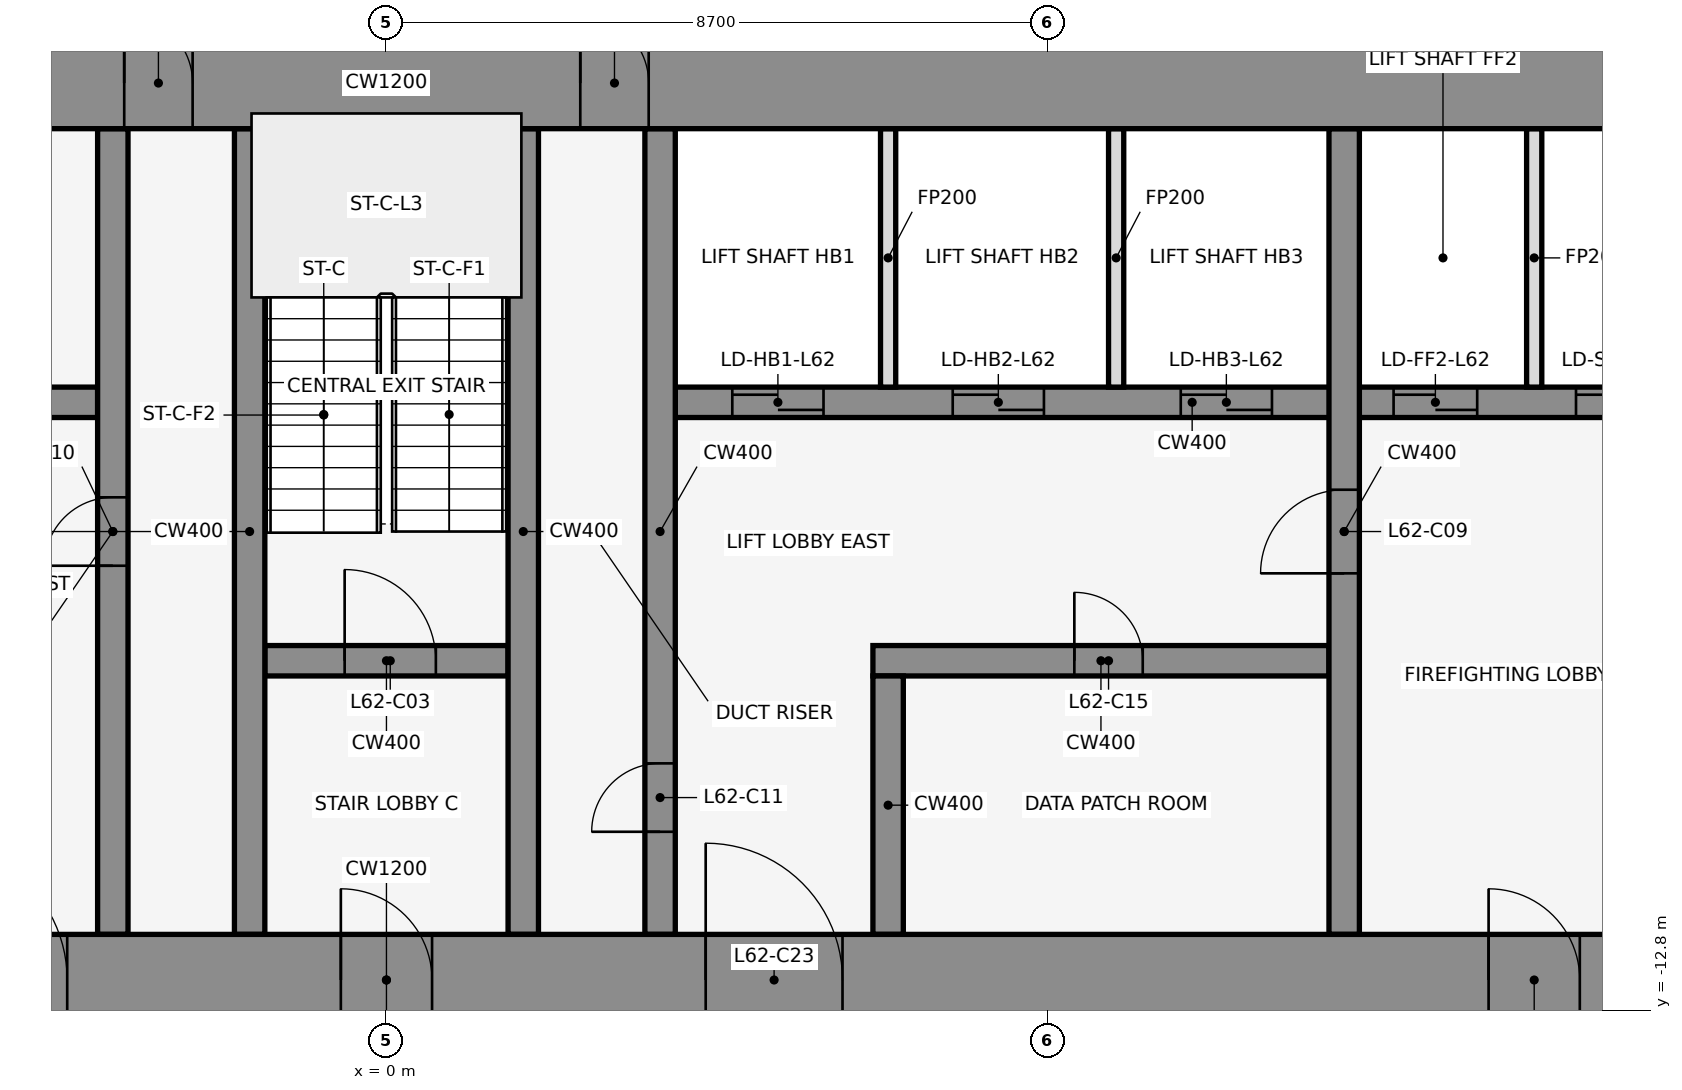
"""IFC4 building model, lengths in metres.
Left out: names, types, materials, properties, quantities, classifications, styles, units other than length and angle.
Written with IfcOpenShell. Run it as: python <this file> out.ifc"""

import sys

from ifc_helpers import new_model, si_unit, direction, frame, frame_2d, origin, place, context, subcontext, project, spatial, rectangle, extrude, element, fill, save


model = new_model("IFC4")
c1 = context("Model", 3, precision=1e-05, world=origin(), true_north=direction((0.0, 1.0)))
c2 = subcontext(c1, "Body", "Model", "MODEL_VIEW")
j1 = project(units=[si_unit("LENGTHUNIT", "METRE"), si_unit("PLANEANGLEUNIT", "RADIAN")], contexts=[c1])
p1 = place(None, origin())
s1 = spatial("IfcSite", under=j1, at=p1, CompositionType="ELEMENT")
p2 = place(p1, origin())
s2 = spatial("IfcBuilding", under=s1, at=p2, CompositionType="ELEMENT")
p3 = place(p2, frame((0.0, 0.0, 275.0)))
s3 = spatial("IfcBuildingStorey", under=s2, at=p3, CompositionType="ELEMENT", Elevation=275.0)
for number, where, z_axis, x_axis in (
    (1, (16.432, -0.105, 0.0), (0.0, 0.0, 1.0), (-0.84, 0.543, 0.0)),
    (2, (1.901, 1.08, 0.0), (0.0, 0.0, 1.0), (-0.84, -0.543, 0.0)),
    (3, (-0.068, -0.105, 0.0), (0.0, 0.0, 1.0), (-0.84, 0.543, 0.0)),
):
    element("IfcWall", number, at=place(p3, frame(where, z_axis=z_axis, x_axis=x_axis)), inside=s3, PredefinedType="STANDARD", context=c2, shape_type="SweptSolid", body=[
        extrude(rectangle(XDim=2.183, YDim=0.25, at=frame_2d((1.091, 0.0))), origin(), (0.0, 0.0, 1.0), 4.05),
    ])
p4 = place(p3, frame((-1.6, -8.2, 0.0), z_axis=(0.0, 0.0, 1.0), x_axis=(1.0, 0.0, 0.0)))
e4 = element("IfcWall", 4, at=p4, inside=s3, PredefinedType="SHEAR", context=c2, shape_type="SweptSolid", body=[
    extrude(rectangle(XDim=3.2, YDim=0.4, at=frame_2d((1.6, 0.0))), origin(), (0.0, 0.0, 1.0), 4.2),
])
p5 = place(p4, frame((1.05, 0.0, 0.0)))
e5 = element("IfcOpeningElement", 5, at=p5, cuts=e4, PredefinedType="OPENING", context=c2, shape_type="SweptSolid", body=[
    extrude(rectangle(XDim=1.2, YDim=2.1, at=frame_2d((0.6, 1.05))), frame((0.0, 0.212, 0.0), z_axis=(0.0, -1.0, 0.0), x_axis=(1.0, 0.0, 0.0)), (0.0, 0.0, 1.0), 0.424),
])
p6 = place(p3, frame((6.4, -8.2, 0.0), z_axis=(0.0, 0.0, 1.0), x_axis=(1.0, 0.0, 0.0)))
e6 = element("IfcWall", 6, at=p6, inside=s3, PredefinedType="SHEAR", context=c2, shape_type="SweptSolid", body=[
    extrude(rectangle(XDim=6.0, YDim=0.4, at=frame_2d((3.0, 0.0))), origin(), (0.0, 0.0, 1.0), 4.2),
])
p7 = place(p6, frame((2.65, 0.0, 0.0)))
e7 = element("IfcOpeningElement", 7, at=p7, cuts=e6, PredefinedType="OPENING", context=c2, shape_type="SweptSolid", body=[
    extrude(rectangle(XDim=0.9, YDim=2.1, at=frame_2d((0.45, 1.05))), frame((0.0, 0.212, 0.0), z_axis=(0.0, -1.0, 0.0), x_axis=(1.0, 0.0, 0.0)), (0.0, 0.0, 1.0), 0.424),
])
p8 = place(p3, frame((-17.4, -4.8, 0.0), z_axis=(0.0, 0.0, 1.0), x_axis=(1.0, 0.0, 0.0)))
e8 = element("IfcWall", 8, at=p8, inside=s3, PredefinedType="SHEAR", context=c2, shape_type="SweptSolid", body=[
    extrude(rectangle(XDim=13.6, YDim=0.4, at=frame_2d((6.8, 0.0))), origin(), (0.0, 0.0, 1.0), 4.2),
])
p9 = place(p8, frame((0.65, 0.0, 0.0)))
e9 = element("IfcOpeningElement", 9, at=p9, cuts=e8, PredefinedType="OPENING", context=c2, shape_type="SweptSolid", body=[
    extrude(rectangle(XDim=1.1, YDim=2.1, at=frame_2d((0.55, 1.05))), frame((0.0, 0.212, 0.0), z_axis=(0.0, -1.0, 0.0), x_axis=(1.0, 0.0, 0.0)), (0.0, 0.0, 1.0), 0.424),
])
p10 = place(p8, frame((2.95, 0.0, 0.0)))
e10 = element("IfcOpeningElement", 10, at=p10, cuts=e8, PredefinedType="OPENING", context=c2, shape_type="SweptSolid", body=[
    extrude(rectangle(XDim=1.1, YDim=2.1, at=frame_2d((0.55, 1.05))), frame((0.0, 0.212, 0.0), z_axis=(0.0, -1.0, 0.0), x_axis=(1.0, 0.0, 0.0)), (0.0, 0.0, 1.0), 0.424),
])
p11 = place(p8, frame((7.35, 0.0, 0.0)))
e11 = element("IfcOpeningElement", 11, at=p11, cuts=e8, PredefinedType="OPENING", context=c2, shape_type="SweptSolid", body=[
    extrude(rectangle(XDim=0.9, YDim=2.1, at=frame_2d((0.45, 1.05))), frame((0.0, 0.212, 0.0), z_axis=(0.0, -1.0, 0.0), x_axis=(1.0, 0.0, 0.0)), (0.0, 0.0, 1.0), 0.424),
])
p12 = place(p8, frame((11.75, 0.0, 0.0)))
e12 = element("IfcOpeningElement", 12, at=p12, cuts=e8, PredefinedType="OPENING", context=c2, shape_type="SweptSolid", body=[
    extrude(rectangle(XDim=0.9, YDim=2.1, at=frame_2d((0.45, 1.05))), frame((0.0, 0.212, 0.0), z_axis=(0.0, -1.0, 0.0), x_axis=(1.0, 0.0, 0.0)), (0.0, 0.0, 1.0), 0.424),
])
p13 = place(p3, frame((3.8, -4.8, 0.0), z_axis=(0.0, 0.0, 1.0), x_axis=(1.0, 0.0, 0.0)))
e13 = element("IfcWall", 13, at=p13, inside=s3, PredefinedType="SHEAR", context=c2, shape_type="SweptSolid", body=[
    extrude(rectangle(XDim=13.6, YDim=0.4, at=frame_2d((6.8, 0.0))), origin(), (0.0, 0.0, 1.0), 4.2),
])
p14 = place(p13, frame((0.75, 0.0, 0.0)))
e14 = element("IfcOpeningElement", 14, at=p14, cuts=e13, PredefinedType="OPENING", context=c2, shape_type="SweptSolid", body=[
    extrude(rectangle(XDim=1.2, YDim=2.1, at=frame_2d((0.6, 1.05))), frame((0.0, 0.212, 0.0), z_axis=(0.0, -1.0, 0.0), x_axis=(1.0, 0.0, 0.0)), (0.0, 0.0, 1.0), 0.424),
])
p15 = place(p13, frame((3.65, 0.0, 0.0)))
e15 = element("IfcOpeningElement", 15, at=p15, cuts=e13, PredefinedType="OPENING", context=c2, shape_type="SweptSolid", body=[
    extrude(rectangle(XDim=1.2, YDim=2.1, at=frame_2d((0.6, 1.05))), frame((0.0, 0.212, 0.0), z_axis=(0.0, -1.0, 0.0), x_axis=(1.0, 0.0, 0.0)), (0.0, 0.0, 1.0), 0.424),
])
p16 = place(p13, frame((6.65, 0.0, 0.0)))
e16 = element("IfcOpeningElement", 16, at=p16, cuts=e13, PredefinedType="OPENING", context=c2, shape_type="SweptSolid", body=[
    extrude(rectangle(XDim=1.2, YDim=2.1, at=frame_2d((0.6, 1.05))), frame((0.0, 0.212, 0.0), z_axis=(0.0, -1.0, 0.0), x_axis=(1.0, 0.0, 0.0)), (0.0, 0.0, 1.0), 0.424),
])
p17 = place(p13, frame((9.45, 0.0, 0.0)))
e17 = element("IfcOpeningElement", 17, at=p17, cuts=e13, PredefinedType="OPENING", context=c2, shape_type="SweptSolid", body=[
    extrude(rectangle(XDim=1.1, YDim=2.1, at=frame_2d((0.55, 1.05))), frame((0.0, 0.212, 0.0), z_axis=(0.0, -1.0, 0.0), x_axis=(1.0, 0.0, 0.0)), (0.0, 0.0, 1.0), 0.424),
])
p18 = place(p13, frame((11.85, 0.0, 0.0)))
e18 = element("IfcOpeningElement", 18, at=p18, cuts=e13, PredefinedType="OPENING", context=c2, shape_type="SweptSolid", body=[
    extrude(rectangle(XDim=1.1, YDim=2.1, at=frame_2d((0.55, 1.05))), frame((0.0, 0.212, 0.0), z_axis=(0.0, -1.0, 0.0), x_axis=(1.0, 0.0, 0.0)), (0.0, 0.0, 1.0), 0.424),
])
p19 = place(p3, frame((-3.6, -11.8, 0.0), z_axis=(0.0, 0.0, 1.0), x_axis=(0.0, 1.0, 0.0)))
e19 = element("IfcWall", 19, at=p19, inside=s3, PredefinedType="SHEAR", context=c2, shape_type="SweptSolid", body=[
    extrude(rectangle(XDim=10.6, YDim=0.4, at=frame_2d((5.3, 0.0))), origin(), (0.0, 0.0, 1.0), 4.2),
])
p20 = place(p19, frame((4.85, 0.0, 0.0)))
e20 = element("IfcOpeningElement", 20, at=p20, cuts=e19, PredefinedType="OPENING", context=c2, shape_type="SweptSolid", body=[
    extrude(rectangle(XDim=0.9, YDim=2.1, at=frame_2d((0.45, 1.05))), frame((0.0, 0.212, 0.0), z_axis=(0.0, -1.0, 0.0), x_axis=(1.0, 0.0, 0.0)), (0.0, 0.0, 1.0), 0.424),
])
for number, where, z_axis, x_axis in (
    (21, (-1.8, -11.8, 0.0), (0.0, 0.0, 1.0), (0.0, 1.0, 0.0)),
    (22, (1.8, -11.8, 0.0), (0.0, 0.0, 1.0), (0.0, 1.0, 0.0)),
):
    element("IfcWall", number, at=place(p3, frame(where, z_axis=z_axis, x_axis=x_axis)), inside=s3, PredefinedType="SHEAR", context=c2, shape_type="SweptSolid", body=[
        extrude(rectangle(XDim=10.6, YDim=0.4, at=frame_2d((5.3, 0.0))), origin(), (0.0, 0.0, 1.0), 4.2),
    ])
p21 = place(p3, frame((3.6, -11.8, 0.0), z_axis=(0.0, 0.0, 1.0), x_axis=(0.0, 1.0, 0.0)))
e23 = element("IfcWall", 23, at=p21, inside=s3, PredefinedType="SHEAR", context=c2, shape_type="SweptSolid", body=[
    extrude(rectangle(XDim=10.6, YDim=0.4, at=frame_2d((5.3, 0.0))), origin(), (0.0, 0.0, 1.0), 4.2),
])
p22 = place(p21, frame((1.35, 0.0, 0.0)))
e24 = element("IfcOpeningElement", 24, at=p22, cuts=e23, PredefinedType="OPENING", context=c2, shape_type="SweptSolid", body=[
    extrude(rectangle(XDim=0.9, YDim=2.1, at=frame_2d((0.45, 1.05))), frame((0.0, 0.212, 0.0), z_axis=(0.0, -1.0, 0.0), x_axis=(1.0, 0.0, 0.0)), (0.0, 0.0, 1.0), 0.424),
])
p23 = place(p3, frame((6.6, -11.8, 0.0), z_axis=(0.0, 0.0, 1.0), x_axis=(0.0, 1.0, 0.0)))
e25 = element("IfcWall", 25, at=p23, inside=s3, PredefinedType="SHEAR", context=c2, shape_type="SweptSolid", body=[
    extrude(rectangle(XDim=3.4, YDim=0.4, at=frame_2d((1.7, 0.0))), origin(), (0.0, 0.0, 1.0), 4.2),
])
for number, where, z_axis, x_axis in (
    (26, (6.6, -4.6, 0.0), (0.0, 0.0, 1.0), (0.0, 1.0, 0.0)),
    (27, (9.6, -4.6, 0.0), (0.0, 0.0, 1.0), (0.0, 1.0, 0.0)),
):
    element("IfcWall", number, at=place(p3, frame(where, z_axis=z_axis, x_axis=x_axis)), inside=s3, PredefinedType="PARTITIONING", context=c2, shape_type="SweptSolid", body=[
        extrude(rectangle(XDim=3.4, YDim=0.2, at=frame_2d((1.7, 0.0))), origin(), (0.0, 0.0, 1.0), 3.118),
    ])
p24 = place(p3, frame((12.6, -11.8, 0.0), z_axis=(0.0, 0.0, 1.0), x_axis=(0.0, 1.0, 0.0)))
e28 = element("IfcWall", 28, at=p24, inside=s3, PredefinedType="SHEAR", context=c2, shape_type="SweptSolid", body=[
    extrude(rectangle(XDim=10.6, YDim=0.4, at=frame_2d((5.3, 0.0))), origin(), (0.0, 0.0, 1.0), 4.2),
])
p25 = place(p24, frame((4.75, 0.0, 0.0)))
e29 = element("IfcOpeningElement", 29, at=p25, cuts=e28, PredefinedType="OPENING", context=c2, shape_type="SweptSolid", body=[
    extrude(rectangle(XDim=1.1, YDim=2.1, at=frame_2d((0.55, 1.05))), frame((0.0, 0.212, 0.0), z_axis=(0.0, -1.0, 0.0), x_axis=(1.0, 0.0, 0.0)), (0.0, 0.0, 1.0), 0.424),
])
p26 = place(p3, frame((15.1, -4.6, 0.0), z_axis=(0.0, 0.0, 1.0), x_axis=(0.0, 1.0, 0.0)))
e30 = element("IfcWall", 30, at=p26, inside=s3, PredefinedType="PARTITIONING", context=c2, shape_type="SweptSolid", body=[
    extrude(rectangle(XDim=3.4, YDim=0.2, at=frame_2d((1.7, 0.0))), origin(), (0.0, 0.0, 1.0), 3.118),
])
p27 = place(p3, frame((-22.0, -0.6, 0.0), z_axis=(0.0, 0.0, 1.0), x_axis=(1.0, 0.0, 0.0)))
e31 = element("IfcWall", 31, at=p27, inside=s3, PredefinedType="SHEAR", context=c2, shape_type="SweptSolid", body=[
    extrude(rectangle(XDim=44.0, YDim=1.2, at=frame_2d((22.0, 0.0))), origin(), (0.0, 0.0, 1.0), 4.2),
])
p28 = place(p27, frame((18.55, 0.0, 0.0)))
e32 = element("IfcOpeningElement", 32, at=p28, cuts=e31, PredefinedType="OPENING", context=c2, shape_type="SweptSolid", body=[
    extrude(rectangle(XDim=0.9, YDim=2.1, at=frame_2d((0.45, 1.05))), frame((0.0, 0.612, 0.0), z_axis=(0.0, -1.0, 0.0), x_axis=(1.0, 0.0, 0.0)), (0.0, 0.0, 1.0), 1.224),
])
p29 = place(p27, frame((24.55, 0.0, 0.0)))
e33 = element("IfcOpeningElement", 33, at=p29, cuts=e31, PredefinedType="OPENING", context=c2, shape_type="SweptSolid", body=[
    extrude(rectangle(XDim=0.9, YDim=2.1, at=frame_2d((0.45, 1.05))), frame((0.0, 0.612, 0.0), z_axis=(0.0, -1.0, 0.0), x_axis=(1.0, 0.0, 0.0)), (0.0, 0.0, 1.0), 1.224),
])
p30 = place(p3, frame((-22.0, -12.4, 0.0), z_axis=(0.0, 0.0, 1.0), x_axis=(1.0, 0.0, 0.0)))
e34 = element("IfcWall", 34, at=p30, inside=s3, PredefinedType="SHEAR", context=c2, shape_type="SweptSolid", body=[
    extrude(rectangle(XDim=44.0, YDim=1.2, at=frame_2d((22.0, 0.0))), origin(), (0.0, 0.0, 1.0), 4.2),
])
p31 = place(p30, frame((2.2, 0.0, 0.0)))
e35 = element("IfcOpeningElement", 35, at=p31, cuts=e34, PredefinedType="OPENING", context=c2, shape_type="SweptSolid", body=[
    extrude(rectangle(XDim=1.2, YDim=2.1, at=frame_2d((0.6, 1.05))), frame((0.0, 0.612, 0.0), z_axis=(0.0, -1.0, 0.0), x_axis=(1.0, 0.0, 0.0)), (0.0, 0.0, 1.0), 1.224),
])
p32 = place(p30, frame((21.4, 0.0, 0.0)))
e36 = element("IfcOpeningElement", 36, at=p32, cuts=e34, PredefinedType="OPENING", context=c2, shape_type="SweptSolid", body=[
    extrude(rectangle(XDim=1.2, YDim=2.1, at=frame_2d((0.6, 1.05))), frame((0.0, 0.612, 0.0), z_axis=(0.0, -1.0, 0.0), x_axis=(1.0, 0.0, 0.0)), (0.0, 0.0, 1.0), 1.224),
])
p33 = place(p30, frame((40.6, 0.0, 0.0)))
e37 = element("IfcOpeningElement", 37, at=p33, cuts=e34, PredefinedType="OPENING", context=c2, shape_type="SweptSolid", body=[
    extrude(rectangle(XDim=1.2, YDim=2.1, at=frame_2d((0.6, 1.05))), frame((0.0, 0.612, 0.0), z_axis=(0.0, -1.0, 0.0), x_axis=(1.0, 0.0, 0.0)), (0.0, 0.0, 1.0), 1.224),
])
p34 = place(p30, frame((16.0, 0.0, 0.0)))
e38 = element("IfcOpeningElement", 38, at=p34, cuts=e34, PredefinedType="OPENING", context=c2, shape_type="SweptSolid", body=[
    extrude(rectangle(XDim=1.8, YDim=2.1, at=frame_2d((0.9, 1.05))), frame((0.0, 0.612, 0.0), z_axis=(0.0, -1.0, 0.0), x_axis=(1.0, 0.0, 0.0)), (0.0, 0.0, 1.0), 1.224),
])
p35 = place(p30, frame((6.3, 0.0, 0.0)))
e39 = element("IfcOpeningElement", 39, at=p35, cuts=e34, PredefinedType="OPENING", context=c2, shape_type="SweptSolid", body=[
    extrude(rectangle(XDim=1.2, YDim=2.1, at=frame_2d((0.6, 1.05))), frame((0.0, 0.612, 0.0), z_axis=(0.0, -1.0, 0.0), x_axis=(1.0, 0.0, 0.0)), (0.0, 0.0, 1.0), 1.224),
])
p36 = place(p30, frame((26.2, 0.0, 0.0)))
e40 = element("IfcOpeningElement", 40, at=p36, cuts=e34, PredefinedType="OPENING", context=c2, shape_type="SweptSolid", body=[
    extrude(rectangle(XDim=1.8, YDim=2.1, at=frame_2d((0.9, 1.05))), frame((0.0, 0.612, 0.0), z_axis=(0.0, -1.0, 0.0), x_axis=(1.0, 0.0, 0.0)), (0.0, 0.0, 1.0), 1.224),
])
p37 = place(p30, frame((36.5, 0.0, 0.0)))
e41 = element("IfcOpeningElement", 41, at=p37, cuts=e34, PredefinedType="OPENING", context=c2, shape_type="SweptSolid", body=[
    extrude(rectangle(XDim=1.2, YDim=2.1, at=frame_2d((0.6, 1.05))), frame((0.0, 0.612, 0.0), z_axis=(0.0, -1.0, 0.0), x_axis=(1.0, 0.0, 0.0)), (0.0, 0.0, 1.0), 1.224),
])
p38 = place(p5, origin())
e42 = element("IfcDoor", 42, at=p38, inside=s3, OperationType="SINGLE_SWING_LEFT", PredefinedType="DOOR", context=c2, shape_type="SweptSolid", body=[
    extrude(rectangle(XDim=1.2, YDim=2.1, at=frame_2d((0.6, 1.05))), frame((0.0, 0.025, 0.0), z_axis=(0.0, -1.0, 0.0), x_axis=(1.0, 0.0, 0.0)), (0.0, 0.0, 1.0), 0.05),
])
fill(e5, e42)
p39 = place(p14, origin())
e43 = element("IfcDoor", 43, at=p39, inside=s3, OperationType="DOUBLE_DOOR_SLIDING", PredefinedType="DOOR", context=c2, shape_type="SweptSolid", body=[
    extrude(rectangle(XDim=1.2, YDim=2.1, at=frame_2d((0.6, 1.05))), frame((0.0, 0.025, 0.0), z_axis=(0.0, -1.0, 0.0), x_axis=(1.0, 0.0, 0.0)), (0.0, 0.0, 1.0), 0.05),
])
fill(e14, e43)
p40 = place(p15, origin())
e44 = element("IfcDoor", 44, at=p40, inside=s3, OperationType="DOUBLE_DOOR_SLIDING", PredefinedType="DOOR", context=c2, shape_type="SweptSolid", body=[
    extrude(rectangle(XDim=1.2, YDim=2.1, at=frame_2d((0.6, 1.05))), frame((0.0, 0.025, 0.0), z_axis=(0.0, -1.0, 0.0), x_axis=(1.0, 0.0, 0.0)), (0.0, 0.0, 1.0), 0.05),
])
fill(e15, e44)
p41 = place(p16, origin())
e45 = element("IfcDoor", 45, at=p41, inside=s3, OperationType="DOUBLE_DOOR_SLIDING", PredefinedType="DOOR", context=c2, shape_type="SweptSolid", body=[
    extrude(rectangle(XDim=1.2, YDim=2.1, at=frame_2d((0.6, 1.05))), frame((0.0, 0.025, 0.0), z_axis=(0.0, -1.0, 0.0), x_axis=(1.0, 0.0, 0.0)), (0.0, 0.0, 1.0), 0.05),
])
fill(e16, e45)
p42 = place(p17, origin())
e46 = element("IfcDoor", 46, at=p42, inside=s3, OperationType="DOUBLE_DOOR_SLIDING", PredefinedType="DOOR", context=c2, shape_type="SweptSolid", body=[
    extrude(rectangle(XDim=1.1, YDim=2.1, at=frame_2d((0.55, 1.05))), frame((0.0, 0.025, 0.0), z_axis=(0.0, -1.0, 0.0), x_axis=(1.0, 0.0, 0.0)), (0.0, 0.0, 1.0), 0.05),
])
fill(e17, e46)
p43 = place(p18, origin())
e47 = element("IfcDoor", 47, at=p43, inside=s3, OperationType="DOUBLE_DOOR_SLIDING", PredefinedType="DOOR", context=c2, shape_type="SweptSolid", body=[
    extrude(rectangle(XDim=1.1, YDim=2.1, at=frame_2d((0.55, 1.05))), frame((0.0, 0.025, 0.0), z_axis=(0.0, -1.0, 0.0), x_axis=(1.0, 0.0, 0.0)), (0.0, 0.0, 1.0), 0.05),
])
fill(e18, e47)
p44 = place(p25, frame((1.1, 0.0, 0.0), z_axis=(0.0, 0.0, 1.0), x_axis=(-1.0, 0.0, 0.0)))
e48 = element("IfcDoor", 48, at=p44, inside=s3, OperationType="SINGLE_SWING_RIGHT", PredefinedType="DOOR", context=c2, shape_type="SweptSolid", body=[
    extrude(rectangle(XDim=1.1, YDim=2.1, at=frame_2d((0.55, 1.05))), frame((0.0, 0.025, 0.0), z_axis=(0.0, -1.0, 0.0), x_axis=(1.0, 0.0, 0.0)), (0.0, 0.0, 1.0), 0.05),
])
fill(e29, e48)
p45 = place(p20, frame((0.9, 0.0, 0.0), z_axis=(0.0, 0.0, 1.0), x_axis=(-1.0, 0.0, 0.0)))
e49 = element("IfcDoor", 49, at=p45, inside=s3, OperationType="SINGLE_SWING_LEFT", PredefinedType="DOOR", context=c2, shape_type="SweptSolid", body=[
    extrude(rectangle(XDim=0.9, YDim=2.1, at=frame_2d((0.45, 1.05))), frame((0.0, 0.025, 0.0), z_axis=(0.0, -1.0, 0.0), x_axis=(1.0, 0.0, 0.0)), (0.0, 0.0, 1.0), 0.05),
])
fill(e20, e49)
p46 = place(p22, origin())
e50 = element("IfcDoor", 50, at=p46, inside=s3, OperationType="SINGLE_SWING_LEFT", PredefinedType="DOOR", context=c2, shape_type="SweptSolid", body=[
    extrude(rectangle(XDim=0.9, YDim=2.1, at=frame_2d((0.45, 1.05))), frame((0.0, 0.025, 0.0), z_axis=(0.0, -1.0, 0.0), x_axis=(1.0, 0.0, 0.0)), (0.0, 0.0, 1.0), 0.05),
])
fill(e24, e50)
p47 = place(p7, frame((0.9, 0.0, 0.0), z_axis=(0.0, 0.0, 1.0), x_axis=(-1.0, 0.0, 0.0)))
e51 = element("IfcDoor", 51, at=p47, inside=s3, OperationType="SINGLE_SWING_RIGHT", PredefinedType="DOOR", context=c2, shape_type="SweptSolid", body=[
    extrude(rectangle(XDim=0.9, YDim=2.1, at=frame_2d((0.45, 1.05))), frame((0.0, 0.025, 0.0), z_axis=(0.0, -1.0, 0.0), x_axis=(1.0, 0.0, 0.0)), (0.0, 0.0, 1.0), 0.05),
])
fill(e7, e51)
p48 = place(p28, origin())
e52 = element("IfcDoor", 52, at=p48, inside=s3, OperationType="SINGLE_SWING_LEFT", PredefinedType="DOOR", context=c2, shape_type="SweptSolid", body=[
    extrude(rectangle(XDim=0.9, YDim=2.1, at=frame_2d((0.45, 1.05))), frame((0.0, 0.025, 0.0), z_axis=(0.0, -1.0, 0.0), x_axis=(1.0, 0.0, 0.0)), (0.0, 0.0, 1.0), 0.05),
])
fill(e32, e52)
p49 = place(p29, origin())
e53 = element("IfcDoor", 53, at=p49, inside=s3, OperationType="SINGLE_SWING_LEFT", PredefinedType="DOOR", context=c2, shape_type="SweptSolid", body=[
    extrude(rectangle(XDim=0.9, YDim=2.1, at=frame_2d((0.45, 1.05))), frame((0.0, 0.025, 0.0), z_axis=(0.0, -1.0, 0.0), x_axis=(1.0, 0.0, 0.0)), (0.0, 0.0, 1.0), 0.05),
])
fill(e33, e53)
p50 = place(p32, frame((1.2, 0.0, 0.0), z_axis=(0.0, 0.0, 1.0), x_axis=(-1.0, 0.0, 0.0)))
e54 = element("IfcDoor", 54, at=p50, inside=s3, OperationType="SINGLE_SWING_RIGHT", PredefinedType="DOOR", context=c2, shape_type="SweptSolid", body=[
    extrude(rectangle(XDim=1.2, YDim=2.1, at=frame_2d((0.6, 1.05))), frame((0.0, 0.025, 0.0), z_axis=(0.0, -1.0, 0.0), x_axis=(1.0, 0.0, 0.0)), (0.0, 0.0, 1.0), 0.05),
])
fill(e36, e54)
p51 = place(p34, origin())
e55 = element("IfcDoor", 55, at=p51, inside=s3, OperationType="SINGLE_SWING_LEFT", PredefinedType="DOOR", context=c2, shape_type="SweptSolid", body=[
    extrude(rectangle(XDim=1.8, YDim=2.1, at=frame_2d((0.9, 1.05))), frame((0.0, 0.025, 0.0), z_axis=(0.0, -1.0, 0.0), x_axis=(1.0, 0.0, 0.0)), (0.0, 0.0, 1.0), 0.05),
])
fill(e38, e55)
p52 = place(p36, origin())
e56 = element("IfcDoor", 56, at=p52, inside=s3, OperationType="SINGLE_SWING_LEFT", PredefinedType="DOOR", context=c2, shape_type="SweptSolid", body=[
    extrude(rectangle(XDim=1.8, YDim=2.1, at=frame_2d((0.9, 1.05))), frame((0.0, 0.025, 0.0), z_axis=(0.0, -1.0, 0.0), x_axis=(1.0, 0.0, 0.0)), (0.0, 0.0, 1.0), 0.05),
])
fill(e40, e56)
p53 = place(p37, frame((1.2, 0.0, 0.0), z_axis=(0.0, 0.0, 1.0), x_axis=(-1.0, 0.0, 0.0)))
e57 = element("IfcDoor", 57, at=p53, inside=s3, OperationType="SINGLE_SWING_RIGHT", PredefinedType="DOOR", context=c2, shape_type="SweptSolid", body=[
    extrude(rectangle(XDim=1.2, YDim=2.1, at=frame_2d((0.6, 1.05))), frame((0.0, 0.025, 0.0), z_axis=(0.0, -1.0, 0.0), x_axis=(1.0, 0.0, 0.0)), (0.0, 0.0, 1.0), 0.05),
])
fill(e41, e57)
save(model, sys.argv[1])
